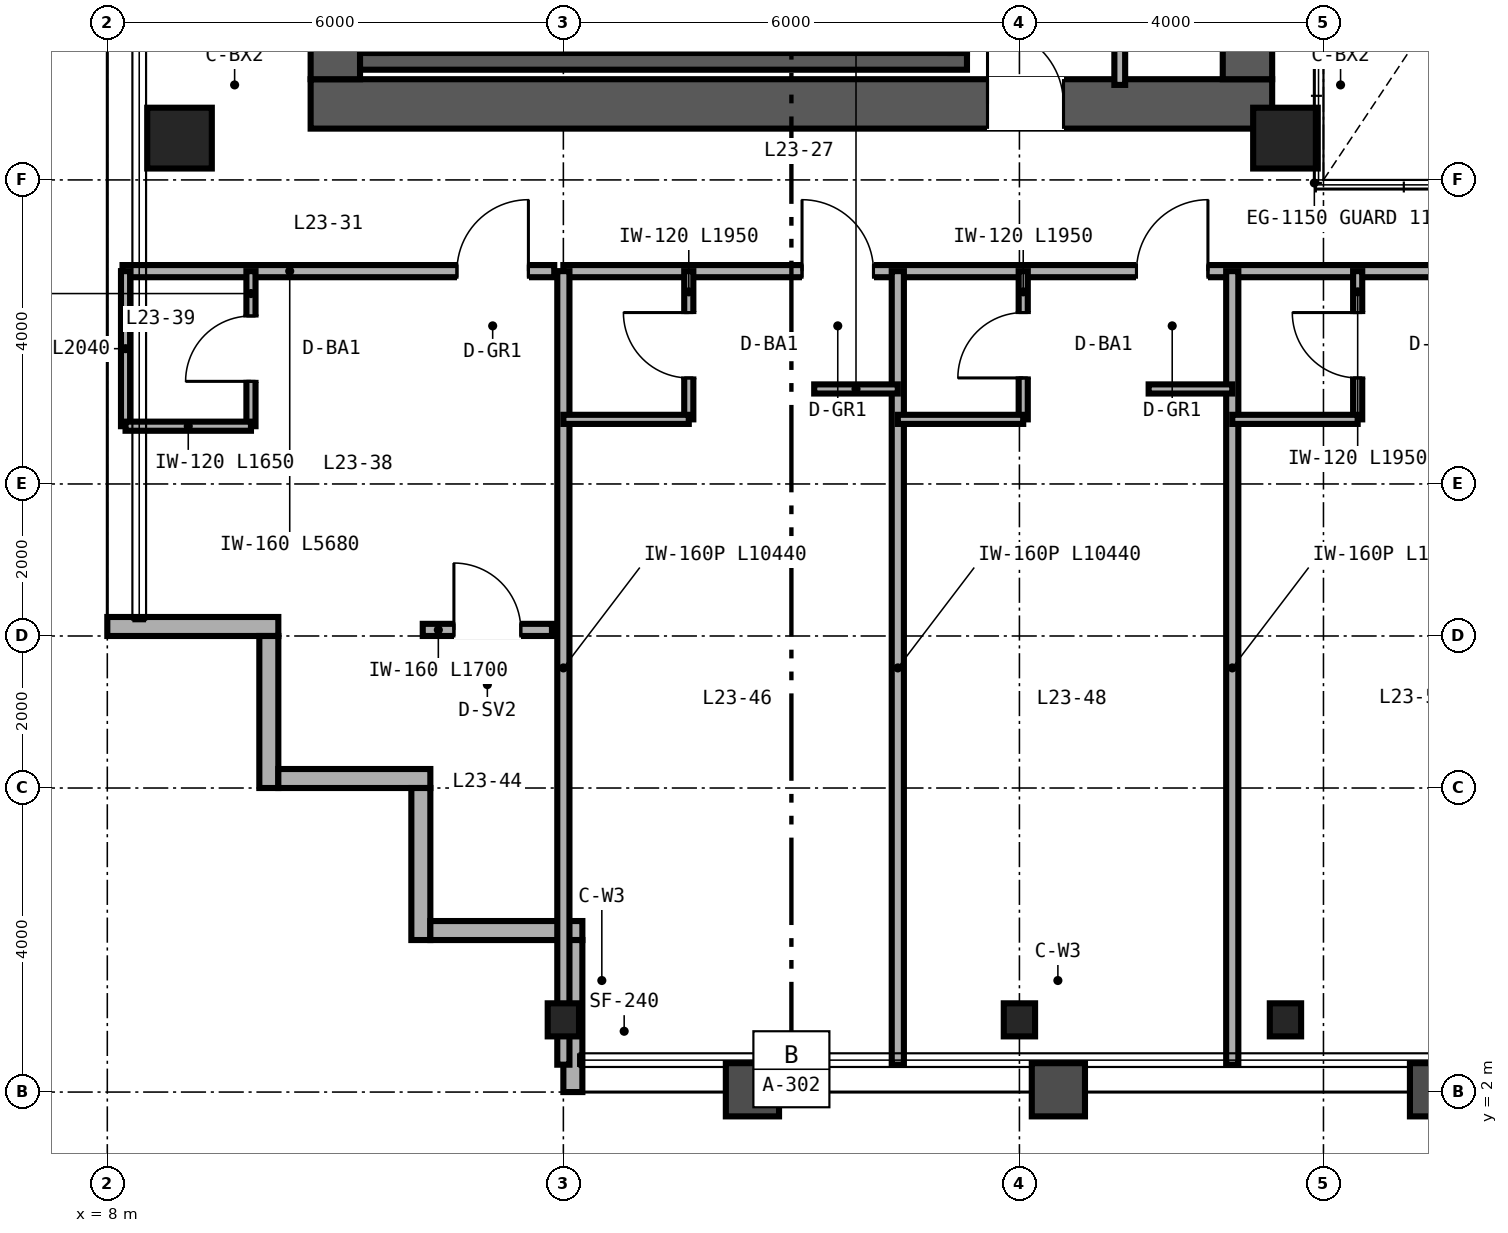
"""IFC4 building model, lengths in metres.
Left out: names, types, materials, properties, quantities, classifications, styles, units other than length and angle.
Written with IfcOpenShell. Run it as: python <this file> out.ifc"""

import sys

from ifc_helpers import new_model, si_unit, direction, frame, frame_2d, origin, origin_2d, place, context, subcontext, project, spatial, rectangle, hollow_rectangle, i_section, extrude, source, transform, mapped, element, fill, save


model = new_model("IFC4")
c1 = context("Model", 3, precision=1e-05, world=origin(), true_north=direction((0.0, 1.0)))
c2 = subcontext(c1, "Body", "Model", "MODEL_VIEW")
j1 = project(units=[si_unit("LENGTHUNIT", "METRE"), si_unit("PLANEANGLEUNIT", "RADIAN")], contexts=[c1])
p1 = place(None, origin())
s1 = spatial("IfcSite", under=j1, at=p1, CompositionType="ELEMENT")
p2 = place(p1, origin())
s2 = spatial("IfcBuilding", under=s1, at=p2, CompositionType="ELEMENT")
p3 = place(p2, frame((0.0, 0.0, 97.2)))
s3 = spatial("IfcBuildingStorey", under=s2, at=p3, CompositionType="ELEMENT", Elevation=97.2)
p4 = place(p3, frame((10.675, 15.0, 0.0), z_axis=(0.0, 0.0, 1.0), x_axis=(1.0, 0.0, 0.0)))
e1 = element("IfcWall", 1, at=p4, inside=s3, PredefinedType="SHEAR", context=c2, shape_type="SweptSolid", body=[
    extrude(rectangle(XDim=12.65, YDim=0.65, at=frame_2d((6.325, 0.0))), origin(), (0.0, 0.0, 1.0), 3.36),
])
p5 = place(p4, frame((8.905, 0.0, 0.0)))
e2 = element("IfcOpeningElement", 2, at=p5, cuts=e1, PredefinedType="OPENING", context=c2, shape_type="SweptSolid", body=[
    extrude(rectangle(XDim=1.0, YDim=2.15, at=frame_2d((0.5, 1.075))), frame((0.0, 0.335, 0.0), z_axis=(0.0, -1.0, 0.0), x_axis=(1.0, 0.0, 0.0)), (0.0, 0.0, 1.0), 0.67),
])
for number, where, z_axis, x_axis in (
    (3, (11.0, 15.325, 0.0), (0.0, 0.0, 1.0), (0.0, 1.0, 0.0)),
    (4, (23.0, 15.325, 0.0), (0.0, 0.0, 1.0), (0.0, 1.0, 0.0)),
):
    element("IfcWall", number, at=place(p3, frame(where, z_axis=z_axis, x_axis=x_axis)), inside=s3, PredefinedType="SHEAR", context=c2, shape_type="SweptSolid", body=[
        extrude(rectangle(XDim=21.35, YDim=0.65, at=frame_2d((10.675, 0.0))), origin(), (0.0, 0.0, 1.0), 3.36),
    ])
p6 = place(p3, frame((11.325, 15.56, 0.0), z_axis=(0.0, 0.0, 1.0), x_axis=(1.0, 0.0, 0.0)))
e5 = element("IfcWall", 5, at=p6, inside=s3, PredefinedType="SHEAR", context=c2, shape_type="SweptSolid", body=[
    extrude(rectangle(XDim=7.985, YDim=0.22, at=frame_2d((3.993, 0.0))), origin(), (0.0, 0.0, 1.0), 3.4),
])
for number, where, z_axis, x_axis in (
    (6, (11.56, 15.67, 0.0), (0.0, 0.0, 1.0), (0.0, 1.0, 0.0)),
    (7, (19.2, 15.67, 0.0), (0.0, 0.0, 1.0), (0.0, 1.0, 0.0)),
):
    element("IfcWall", number, at=place(p3, frame(where, z_axis=z_axis, x_axis=x_axis)), inside=s3, PredefinedType="SHEAR", context=c2, shape_type="SweptSolid", body=[
        extrude(rectangle(XDim=3.28, YDim=0.22, at=frame_2d((1.64, 0.0))), origin(), (0.0, 0.0, 1.0), 3.4),
    ])
m1 = source(origin(), c2, "Body", "SweptSolid", [
    extrude(hollow_rectangle(XDim=0.85, YDim=0.8, WallThickness=0.032, at=origin_2d()), origin(), (0.0, 0.0, 1.0), 3.36),
])
for number, where, z_axis, x_axis in (
    (8, (8.95, 14.55, 0.0), (0.0, 0.0, 1.0), (1.0, 0.0, 0.0)),
    (9, (23.5, 14.55, 0.0), (0.0, 0.0, 1.0), (1.0, 0.0, 0.0)),
):
    element("IfcColumn", number, at=place(p3, frame(where, z_axis=z_axis, x_axis=x_axis)), inside=s3, PredefinedType="COLUMN", context=c2, shape_type="MappedRepresentation", body=[
        mapped(m1, transform((0.0, 0.0, 0.0), scale=1.0)),
    ])
m2 = source(origin(), c2, "Body", "SweptSolid", [
    extrude(i_section(OverallWidth=0.412, OverallDepth=0.435, WebThickness=0.036, FlangeThickness=0.057, FilletRadius=0.025, at=origin_2d()), origin(), (0.0, 0.0, 1.0), 3.36),
])
for number, where, z_axis, x_axis in (
    (10, (14.0, 2.95, 0.0), (0.0, 0.0, 1.0), (1.0, 0.0, 0.0)),
    (11, (20.0, 2.95, 0.0), (0.0, 0.0, 1.0), (1.0, 0.0, 0.0)),
    (12, (23.5, 2.95, 0.0), (0.0, 0.0, 1.0), (1.0, 0.0, 0.0)),
):
    element("IfcColumn", number, at=place(p3, frame(where, z_axis=z_axis, x_axis=x_axis)), inside=s3, PredefinedType="COLUMN", context=c2, shape_type="MappedRepresentation", body=[
        mapped(m2, transform((0.0, 0.0, 0.0), scale=1.0)),
    ])
p7 = place(p3, frame((8.0, 8.125, 0.0), z_axis=(0.0, 0.0, 1.0), x_axis=(1.0, 0.0, 0.0)))
e13 = element("IfcWall", 13, at=p7, inside=s3, PredefinedType="SOLIDWALL", context=c2, shape_type="SweptSolid", body=[
    extrude(rectangle(XDim=2.25, YDim=0.25, at=frame_2d((1.125, 0.0))), origin(), (0.0, 0.0, 1.0), 3.36),
])
for number, where, z_axis, x_axis in (
    (14, (10.125, 8.0, 0.0), (0.0, 0.0, 1.0), (0.0, -1.0, 0.0)),
    (15, (10.25, 6.125, 0.0), (0.0, 0.0, 1.0), (1.0, 0.0, 0.0)),
    (16, (12.125, 6.0, 0.0), (0.0, 0.0, 1.0), (0.0, -1.0, 0.0)),
    (17, (12.25, 4.125, 0.0), (0.0, 0.0, 1.0), (1.0, 0.0, 0.0)),
):
    element("IfcWall", number, at=place(p3, frame(where, z_axis=z_axis, x_axis=x_axis)), inside=s3, PredefinedType="SOLIDWALL", context=c2, shape_type="SweptSolid", body=[
        extrude(rectangle(XDim=2.0, YDim=0.25, at=frame_2d((1.0, 0.0))), origin(), (0.0, 0.0, 1.0), 3.36),
    ])
p8 = place(p3, frame((14.125, 4.0, 0.0), z_axis=(0.0, 0.0, 1.0), x_axis=(0.0, -1.0, 0.0)))
e18 = element("IfcWall", 18, at=p8, inside=s3, PredefinedType="SOLIDWALL", context=c2, shape_type="SweptSolid", body=[
    extrude(rectangle(XDim=2.0, YDim=0.25, at=frame_2d((1.0, 0.0))), origin(), (0.0, 0.0, 1.0), 2.667),
])
p9 = place(p3, frame((21.32, 15.25, 0.0), z_axis=(0.0, 0.0, 1.0), x_axis=(0.0, 1.0, 0.0)))
e19 = element("IfcWall", 19, at=p9, inside=s3, PredefinedType="PARTITIONING", context=c2, shape_type="SweptSolid", body=[
    extrude(rectangle(XDim=3.59, YDim=0.142, at=frame_2d((1.795, 0.0))), origin(), (0.0, 0.0, 1.0), 3.36),
])
p10 = place(p9, frame((1.25, 0.0, 0.0)))
e20 = element("IfcOpeningElement", 20, at=p10, cuts=e19, PredefinedType="OPENING", context=c2, shape_type="SweptSolid", body=[
    extrude(rectangle(XDim=0.84, YDim=2.1, at=frame_2d((0.42, 1.05))), frame((0.0, 0.081, 0.0), z_axis=(0.0, -1.0, 0.0), x_axis=(1.0, 0.0, 0.0)), (0.0, 0.0, 1.0), 0.162),
])
p11 = place(p3, frame((8.2, 12.8, 0.0), z_axis=(0.0, 0.0, 1.0), x_axis=(1.0, 0.0, 0.0)))
e21 = element("IfcWall", 21, at=p11, inside=s3, PredefinedType="PARTITIONING", context=c2, shape_type="SweptSolid", body=[
    extrude(rectangle(XDim=5.68, YDim=0.16, at=frame_2d((2.84, 0.0))), origin(), (0.0, 0.0, 1.0), 3.36),
])
p12 = place(p11, frame((4.4, 0.0, 0.0)))
e22 = element("IfcOpeningElement", 22, at=p12, cuts=e21, PredefinedType="OPENING", context=c2, shape_type="SweptSolid", body=[
    extrude(rectangle(XDim=0.94, YDim=2.15, at=frame_2d((0.47, 1.075))), frame((0.0, 0.09, 0.0), z_axis=(0.0, -1.0, 0.0), x_axis=(1.0, 0.0, 0.0)), (0.0, 0.0, 1.0), 0.18),
])
p13 = place(p3, frame((9.89, 10.76, 0.0), z_axis=(0.0, 0.0, 1.0), x_axis=(0.0, 1.0, 0.0)))
e23 = element("IfcWall", 23, at=p13, inside=s3, PredefinedType="PARTITIONING", context=c2, shape_type="SweptSolid", body=[
    extrude(rectangle(XDim=2.04, YDim=0.12, at=frame_2d((1.02, 0.0))), origin(), (0.0, 0.0, 1.0), 3.36),
])
p14 = place(p13, frame((0.59, 0.0, 0.0)))
e24 = element("IfcOpeningElement", 24, at=p14, cuts=e23, PredefinedType="OPENING", context=c2, shape_type="SweptSolid", body=[
    extrude(rectangle(XDim=0.86, YDim=2.1, at=frame_2d((0.43, 1.05))), frame((0.0, 0.07, 0.0), z_axis=(0.0, -1.0, 0.0), x_axis=(1.0, 0.0, 0.0)), (0.0, 0.0, 1.0), 0.14),
])
p15 = place(p3, frame((8.24, 10.76, 0.0), z_axis=(0.0, 0.0, 1.0), x_axis=(0.0, 1.0, 0.0)))
e25 = element("IfcWall", 25, at=p15, inside=s3, PredefinedType="PARTITIONING", context=c2, shape_type="SweptSolid", body=[
    extrude(rectangle(XDim=2.04, YDim=0.12, at=frame_2d((1.02, 0.0))), origin(), (0.0, 0.0, 1.0), 3.36),
])
p16 = place(p3, frame((8.24, 10.76, 0.0), z_axis=(0.0, 0.0, 1.0), x_axis=(1.0, 0.0, 0.0)))
e26 = element("IfcWall", 26, at=p16, inside=s3, PredefinedType="PARTITIONING", context=c2, shape_type="SweptSolid", body=[
    extrude(rectangle(XDim=1.65, YDim=0.12, at=frame_2d((0.825, 0.0))), origin(), (0.0, 0.0, 1.0), 3.36),
])
p17 = place(p3, frame((12.15, 8.08, 0.0), z_axis=(0.0, 0.0, 1.0), x_axis=(1.0, 0.0, 0.0)))
e27 = element("IfcWall", 27, at=p17, inside=s3, PredefinedType="PARTITIONING", context=c2, shape_type="SweptSolid", body=[
    extrude(rectangle(XDim=1.7, YDim=0.16, at=frame_2d((0.85, 0.0))), origin(), (0.0, 0.0, 1.0), 3.36),
])
p18 = place(p17, frame((0.41, 0.0, 0.0)))
e28 = element("IfcOpeningElement", 28, at=p18, cuts=e27, PredefinedType="OPENING", context=c2, shape_type="SweptSolid", body=[
    extrude(rectangle(XDim=0.88, YDim=2.15, at=frame_2d((0.44, 1.075))), frame((0.0, 0.09, 0.0), z_axis=(0.0, -1.0, 0.0), x_axis=(1.0, 0.0, 0.0)), (0.0, 0.0, 1.0), 0.18),
])
p19 = place(p3, frame((14.0, 12.8, 0.0), z_axis=(0.0, 0.0, 1.0), x_axis=(1.0, 0.0, 0.0)))
e29 = element("IfcWall", 29, at=p19, inside=s3, PredefinedType="PARTITIONING", context=c2, shape_type="SweptSolid", body=[
    extrude(rectangle(XDim=36.0, YDim=0.16, at=frame_2d((18.0, 0.0))), origin(), (0.0, 0.0, 1.0), 2.581),
])
p20 = place(p19, frame((3.14, 0.0, 0.0)))
e30 = element("IfcOpeningElement", 30, at=p20, cuts=e29, PredefinedType="OPENING", context=c2, shape_type="SweptSolid", body=[
    extrude(rectangle(XDim=0.94, YDim=2.15, at=frame_2d((0.47, 1.075))), frame((0.0, 0.09, 0.0), z_axis=(0.0, -1.0, 0.0), x_axis=(1.0, 0.0, 0.0)), (0.0, 0.0, 1.0), 0.18),
])
p21 = place(p19, frame((7.54, 0.0, 0.0)))
e31 = element("IfcOpeningElement", 31, at=p21, cuts=e29, PredefinedType="OPENING", context=c2, shape_type="SweptSolid", body=[
    extrude(rectangle(XDim=0.94, YDim=2.15, at=frame_2d((0.47, 1.075))), frame((0.0, 0.09, 0.0), z_axis=(0.0, -1.0, 0.0), x_axis=(1.0, 0.0, 0.0)), (0.0, 0.0, 1.0), 0.18),
])
p22 = place(p19, frame((12.14, 0.0, 0.0)))
e32 = element("IfcOpeningElement", 32, at=p22, cuts=e29, PredefinedType="OPENING", context=c2, shape_type="SweptSolid", body=[
    extrude(rectangle(XDim=0.94, YDim=2.15, at=frame_2d((0.47, 1.075))), frame((0.0, 0.09, 0.0), z_axis=(0.0, -1.0, 0.0), x_axis=(1.0, 0.0, 0.0)), (0.0, 0.0, 1.0), 0.18),
])
p23 = place(p19, frame((16.94, 0.0, 0.0)))
e33 = element("IfcOpeningElement", 33, at=p23, cuts=e29, PredefinedType="OPENING", context=c2, shape_type="SweptSolid", body=[
    extrude(rectangle(XDim=0.94, YDim=2.15, at=frame_2d((0.47, 1.075))), frame((0.0, 0.09, 0.0), z_axis=(0.0, -1.0, 0.0), x_axis=(1.0, 0.0, 0.0)), (0.0, 0.0, 1.0), 0.18),
])
p24 = place(p19, frame((21.74, 0.0, 0.0)))
e34 = element("IfcOpeningElement", 34, at=p24, cuts=e29, PredefinedType="OPENING", context=c2, shape_type="SweptSolid", body=[
    extrude(rectangle(XDim=0.94, YDim=2.15, at=frame_2d((0.47, 1.075))), frame((0.0, 0.09, 0.0), z_axis=(0.0, -1.0, 0.0), x_axis=(1.0, 0.0, 0.0)), (0.0, 0.0, 1.0), 0.18),
])
p25 = place(p19, frame((26.34, 0.0, 0.0)))
e35 = element("IfcOpeningElement", 35, at=p25, cuts=e29, PredefinedType="OPENING", context=c2, shape_type="SweptSolid", body=[
    extrude(rectangle(XDim=0.94, YDim=2.15, at=frame_2d((0.47, 1.075))), frame((0.0, 0.09, 0.0), z_axis=(0.0, -1.0, 0.0), x_axis=(1.0, 0.0, 0.0)), (0.0, 0.0, 1.0), 0.18),
])
p26 = place(p19, frame((30.54, 0.0, 0.0)))
e36 = element("IfcOpeningElement", 36, at=p26, cuts=e29, PredefinedType="OPENING", context=c2, shape_type="SweptSolid", body=[
    extrude(rectangle(XDim=0.94, YDim=2.15, at=frame_2d((0.47, 1.075))), frame((0.0, 0.09, 0.0), z_axis=(0.0, -1.0, 0.0), x_axis=(1.0, 0.0, 0.0)), (0.0, 0.0, 1.0), 0.18),
])
p27 = place(p19, frame((34.74, 0.0, 0.0)))
e37 = element("IfcOpeningElement", 37, at=p27, cuts=e29, PredefinedType="OPENING", context=c2, shape_type="SweptSolid", body=[
    extrude(rectangle(XDim=0.94, YDim=2.15, at=frame_2d((0.47, 1.075))), frame((0.0, 0.09, 0.0), z_axis=(0.0, -1.0, 0.0), x_axis=(1.0, 0.0, 0.0)), (0.0, 0.0, 1.0), 0.18),
])
for number, where, z_axis, x_axis in (
    (38, (14.0, 2.36, 0.0), (0.0, 0.0, 1.0), (0.0, 1.0, 0.0)),
    (39, (18.4, 2.36, 0.0), (0.0, 0.0, 1.0), (0.0, 1.0, 0.0)),
):
    element("IfcWall", number, at=place(p3, frame(where, z_axis=z_axis, x_axis=x_axis)), inside=s3, PredefinedType="PARTITIONING", context=c2, shape_type="SweptSolid", body=[
        extrude(rectangle(XDim=10.44, YDim=0.16, at=frame_2d((5.22, 0.0))), origin(), (0.0, 0.0, 1.0), 2.667),
    ])
p28 = place(p3, frame((15.65, 10.85, 0.0), z_axis=(0.0, 0.0, 1.0), x_axis=(0.0, 1.0, 0.0)))
e40 = element("IfcWall", 40, at=p28, inside=s3, PredefinedType="PARTITIONING", context=c2, shape_type="SweptSolid", body=[
    extrude(rectangle(XDim=1.95, YDim=0.12, at=frame_2d((0.975, 0.0))), origin(), (0.0, 0.0, 1.0), 3.36),
])
p29 = place(p28, frame((0.545, 0.0, 0.0)))
e41 = element("IfcOpeningElement", 41, at=p29, cuts=e40, PredefinedType="OPENING", context=c2, shape_type="SweptSolid", body=[
    extrude(rectangle(XDim=0.86, YDim=2.1, at=frame_2d((0.43, 1.05))), frame((0.0, 0.07, 0.0), z_axis=(0.0, -1.0, 0.0), x_axis=(1.0, 0.0, 0.0)), (0.0, 0.0, 1.0), 0.14),
])
p30 = place(p3, frame((14.0, 10.85, 0.0), z_axis=(0.0, 0.0, 1.0), x_axis=(1.0, 0.0, 0.0)))
e42 = element("IfcWall", 42, at=p30, inside=s3, PredefinedType="PARTITIONING", context=c2, shape_type="SweptSolid", body=[
    extrude(rectangle(XDim=1.65, YDim=0.12, at=frame_2d((0.825, 0.0))), origin(), (0.0, 0.0, 1.0), 3.36),
])
p31 = place(p3, frame((17.3, 11.25, 0.0), z_axis=(0.0, 0.0, 1.0), x_axis=(1.0, 0.0, 0.0)))
e43 = element("IfcWall", 43, at=p31, inside=s3, PredefinedType="PARTITIONING", context=c2, shape_type="SweptSolid", body=[
    extrude(rectangle(XDim=1.1, YDim=0.12, at=frame_2d((0.55, 0.0))), origin(), (0.0, 0.0, 1.0), 3.36),
])
p32 = place(p3, frame((22.8, 2.36, 0.0), z_axis=(0.0, 0.0, 1.0), x_axis=(0.0, 1.0, 0.0)))
e44 = element("IfcWall", 44, at=p32, inside=s3, PredefinedType="PARTITIONING", context=c2, shape_type="SweptSolid", body=[
    extrude(rectangle(XDim=10.44, YDim=0.16, at=frame_2d((5.22, 0.0))), origin(), (0.0, 0.0, 1.0), 2.823),
])
p33 = place(p3, frame((20.05, 10.85, 0.0), z_axis=(0.0, 0.0, 1.0), x_axis=(0.0, 1.0, 0.0)))
e45 = element("IfcWall", 45, at=p33, inside=s3, PredefinedType="PARTITIONING", context=c2, shape_type="SweptSolid", body=[
    extrude(rectangle(XDim=1.95, YDim=0.12, at=frame_2d((0.975, 0.0))), origin(), (0.0, 0.0, 1.0), 3.36),
])
p34 = place(p33, frame((0.545, 0.0, 0.0)))
e46 = element("IfcOpeningElement", 46, at=p34, cuts=e45, PredefinedType="OPENING", context=c2, shape_type="SweptSolid", body=[
    extrude(rectangle(XDim=0.86, YDim=2.1, at=frame_2d((0.43, 1.05))), frame((0.0, 0.07, 0.0), z_axis=(0.0, -1.0, 0.0), x_axis=(1.0, 0.0, 0.0)), (0.0, 0.0, 1.0), 0.14),
])
p35 = place(p3, frame((18.4, 10.85, 0.0), z_axis=(0.0, 0.0, 1.0), x_axis=(1.0, 0.0, 0.0)))
e47 = element("IfcWall", 47, at=p35, inside=s3, PredefinedType="PARTITIONING", context=c2, shape_type="SweptSolid", body=[
    extrude(rectangle(XDim=1.65, YDim=0.12, at=frame_2d((0.825, 0.0))), origin(), (0.0, 0.0, 1.0), 3.36),
])
p36 = place(p3, frame((21.7, 11.25, 0.0), z_axis=(0.0, 0.0, 1.0), x_axis=(1.0, 0.0, 0.0)))
e48 = element("IfcWall", 48, at=p36, inside=s3, PredefinedType="PARTITIONING", context=c2, shape_type="SweptSolid", body=[
    extrude(rectangle(XDim=1.1, YDim=0.12, at=frame_2d((0.55, 0.0))), origin(), (0.0, 0.0, 1.0), 3.36),
])
p37 = place(p3, frame((24.45, 10.85, 0.0), z_axis=(0.0, 0.0, 1.0), x_axis=(0.0, 1.0, 0.0)))
e49 = element("IfcWall", 49, at=p37, inside=s3, PredefinedType="PARTITIONING", context=c2, shape_type="SweptSolid", body=[
    extrude(rectangle(XDim=1.95, YDim=0.12, at=frame_2d((0.975, 0.0))), origin(), (0.0, 0.0, 1.0), 3.36),
])
p38 = place(p37, frame((0.545, 0.0, 0.0)))
e50 = element("IfcOpeningElement", 50, at=p38, cuts=e49, PredefinedType="OPENING", context=c2, shape_type="SweptSolid", body=[
    extrude(rectangle(XDim=0.86, YDim=2.1, at=frame_2d((0.43, 1.05))), frame((0.0, 0.07, 0.0), z_axis=(0.0, -1.0, 0.0), x_axis=(1.0, 0.0, 0.0)), (0.0, 0.0, 1.0), 0.14),
])
p39 = place(p3, frame((22.8, 10.85, 0.0), z_axis=(0.0, 0.0, 1.0), x_axis=(1.0, 0.0, 0.0)))
e51 = element("IfcWall", 51, at=p39, inside=s3, PredefinedType="PARTITIONING", context=c2, shape_type="SweptSolid", body=[
    extrude(rectangle(XDim=1.65, YDim=0.12, at=frame_2d((0.825, 0.0))), origin(), (0.0, 0.0, 1.0), 2.581),
])
m3 = source(origin(), c2, "Body", "SweptSolid", [
    extrude(rectangle(XDim=1.0, YDim=2.15, at=frame_2d((0.5, 1.075))), frame((0.0, 0.025, 0.0), z_axis=(0.0, -1.0, 0.0), x_axis=(1.0, 0.0, 0.0)), (0.0, 0.0, 1.0), 0.05),
])
p40 = place(p5, origin())
e52 = element("IfcDoor", 52, at=p40, inside=s3, OperationType="SINGLE_SWING_LEFT", PredefinedType="DOOR", context=c2, shape_type="MappedRepresentation", body=[
    mapped(m3, transform((0.0, 0.0, 0.0), scale=1.0)),
])
fill(e2, e52)
m4 = source(origin(), c2, "Body", "SweptSolid", [
    extrude(rectangle(XDim=0.86, YDim=2.1, at=frame_2d((0.43, 1.05))), frame((0.0, 0.025, 0.0), z_axis=(0.0, -1.0, 0.0), x_axis=(1.0, 0.0, 0.0)), (0.0, 0.0, 1.0), 0.05),
])
p41 = place(p14, origin())
e53 = element("IfcDoor", 53, at=p41, inside=s3, OperationType="SINGLE_SWING_LEFT", PredefinedType="DOOR", context=c2, shape_type="MappedRepresentation", body=[
    mapped(m4, transform((0.0, 0.0, 0.0), scale=1.0)),
])
fill(e24, e53)
m5 = source(origin(), c2, "Body", "SweptSolid", [
    extrude(rectangle(XDim=0.94, YDim=2.15, at=frame_2d((0.47, 1.075))), frame((0.0, 0.025, 0.0), z_axis=(0.0, -1.0, 0.0), x_axis=(1.0, 0.0, 0.0)), (0.0, 0.0, 1.0), 0.05),
])
p42 = place(p12, origin())
e54 = element("IfcDoor", 54, at=p42, inside=s3, OperationType="SINGLE_SWING_RIGHT", PredefinedType="DOOR", context=c2, shape_type="MappedRepresentation", body=[
    mapped(m5, transform((0.0, 0.0, 0.0), scale=1.0)),
])
fill(e22, e54)
m6 = source(origin(), c2, "Body", "SweptSolid", [
    extrude(rectangle(XDim=0.88, YDim=2.15, at=frame_2d((0.44, 1.075))), frame((0.0, 0.025, 0.0), z_axis=(0.0, -1.0, 0.0), x_axis=(1.0, 0.0, 0.0)), (0.0, 0.0, 1.0), 0.05),
])
p43 = place(p18, origin())
e55 = element("IfcDoor", 55, at=p43, inside=s3, OperationType="SINGLE_SWING_LEFT", PredefinedType="DOOR", context=c2, shape_type="MappedRepresentation", body=[
    mapped(m6, transform((0.0, 0.0, 0.0), scale=1.0)),
])
fill(e28, e55)
p44 = place(p29, origin())
e56 = element("IfcDoor", 56, at=p44, inside=s3, OperationType="SINGLE_SWING_RIGHT", PredefinedType="DOOR", context=c2, shape_type="MappedRepresentation", body=[
    mapped(m4, transform((0.0, 0.0, 0.0), scale=1.0)),
])
fill(e41, e56)
p45 = place(p34, origin())
e57 = element("IfcDoor", 57, at=p45, inside=s3, OperationType="SINGLE_SWING_LEFT", PredefinedType="DOOR", context=c2, shape_type="MappedRepresentation", body=[
    mapped(m4, transform((0.0, 0.0, 0.0), scale=1.0)),
])
fill(e46, e57)
p46 = place(p38, origin())
e58 = element("IfcDoor", 58, at=p46, inside=s3, OperationType="SINGLE_SWING_RIGHT", PredefinedType="DOOR", context=c2, shape_type="MappedRepresentation", body=[
    mapped(m4, transform((0.0, 0.0, 0.0), scale=1.0)),
])
fill(e50, e58)
p47 = place(p20, origin())
e59 = element("IfcDoor", 59, at=p47, inside=s3, OperationType="SINGLE_SWING_LEFT", PredefinedType="DOOR", context=c2, shape_type="MappedRepresentation", body=[
    mapped(m5, transform((0.0, 0.0, 0.0), scale=1.0)),
])
fill(e30, e59)
p48 = place(p21, origin())
e60 = element("IfcDoor", 60, at=p48, inside=s3, OperationType="SINGLE_SWING_RIGHT", PredefinedType="DOOR", context=c2, shape_type="MappedRepresentation", body=[
    mapped(m5, transform((0.0, 0.0, 0.0), scale=1.0)),
])
fill(e31, e60)
save(model, sys.argv[1])
